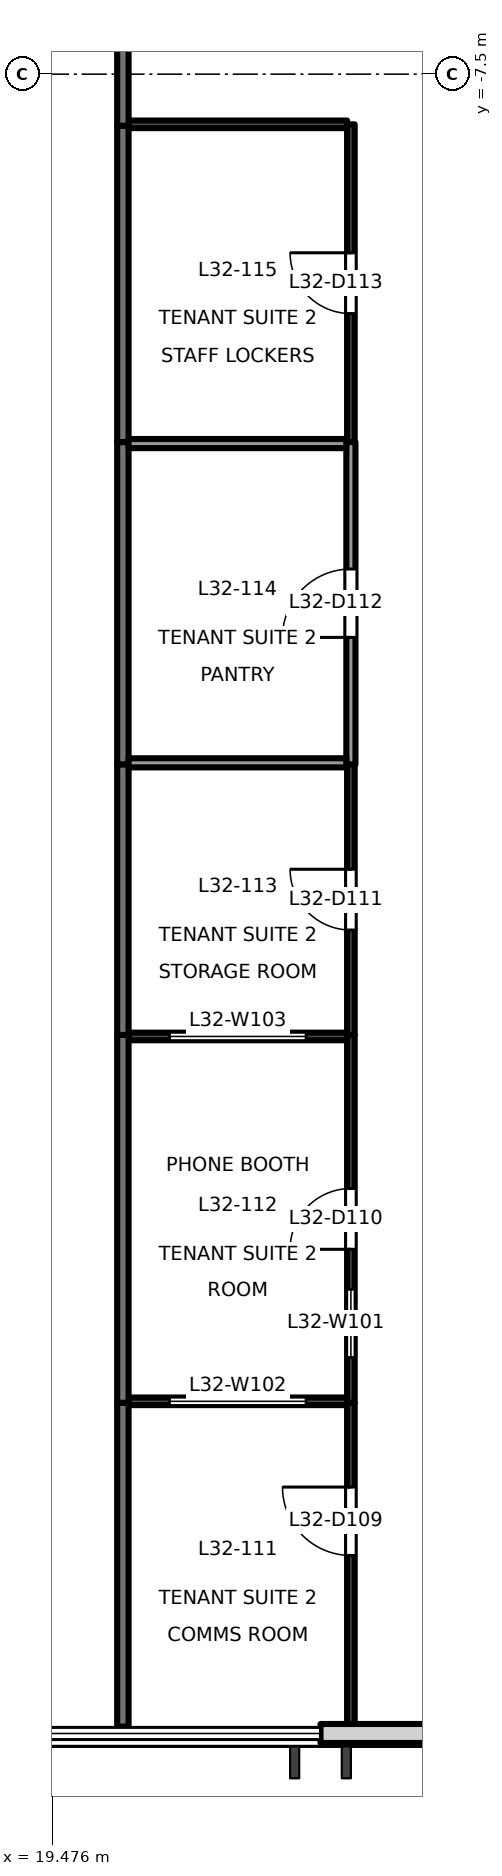
"""IFC4 building model, lengths in metres.
Left out: names, types, materials, properties, quantities, classifications, styles, units other than length and angle.
Written with IfcOpenShell. Run it as: python <this file> out.ifc"""

import sys

from ifc_helpers import new_model, si_unit, direction, frame, frame_2d, origin, place, context, subcontext, project, spatial, rectangle, extrude, element, fill, save


model = new_model("IFC4")
c1 = context("Model", 3, precision=1e-05, world=origin(), true_north=direction((0.0, 1.0)))
c2 = subcontext(c1, "Body", "Model", "MODEL_VIEW")
j1 = project(units=[si_unit("LENGTHUNIT", "METRE"), si_unit("PLANEANGLEUNIT", "RADIAN")], contexts=[c1])
p1 = place(None, origin())
s1 = spatial("IfcSite", under=j1, at=p1, CompositionType="ELEMENT")
p2 = place(p1, origin())
s2 = spatial("IfcBuilding", under=s1, at=p2, CompositionType="ELEMENT")
p3 = place(p2, frame((0.0, 0.0, 142.1)))
s3 = spatial("IfcBuildingStorey", under=s2, at=p3, CompositionType="ELEMENT", Elevation=142.1)
p4 = place(p3, frame((23.0, -29.33, 0.0), z_axis=(0.0, 0.0, 1.0), x_axis=(1.0, 0.0, 0.0)))
e1 = element("IfcWall", 1, at=p4, inside=s3, PredefinedType="SOLIDWALL", context=c2, shape_type="SweptSolid", body=[
    extrude(rectangle(XDim=2.705, YDim=0.25, at=frame_2d((1.353, 0.0))), origin(), (0.0, 0.0, 1.0), 3.8),
])
p5 = place(p3, frame((20.4, -2.14, 0.0), z_axis=(0.0, 0.0, 1.0), x_axis=(0.0, -1.0, 0.0)))
e2 = element("IfcWall", 2, at=p5, inside=s3, PredefinedType="PARTITIONING", context=c2, shape_type="SweptSolid", body=[
    extrude(rectangle(XDim=6.04, YDim=0.15, at=frame_2d((3.02, 0.0))), origin(), (0.0, 0.0, 1.0), 3.3),
])
p6 = place(p5, frame((3.055, 0.0, 0.0)))
e3 = element("IfcOpeningElement", 3, at=p6, cuts=e2, PredefinedType="OPENING", context=c2, shape_type="SweptSolid", body=[
    extrude(rectangle(XDim=1.8, YDim=2.1, at=frame_2d((0.9, 1.05))), frame((0.0, 0.085, 0.0), z_axis=(0.0, -1.0, 0.0), x_axis=(1.0, 0.0, 0.0)), (0.0, 0.0, 1.0), 0.171),
])
p7 = place(p3, frame((20.4, -24.98, 0.0), z_axis=(0.0, 0.0, 1.0), x_axis=(0.0, -1.0, 0.0)))
e4 = element("IfcWall", 4, at=p7, inside=s3, PredefinedType="PARTITIONING", context=c2, shape_type="SweptSolid", body=[
    extrude(rectangle(XDim=4.26, YDim=0.15, at=frame_2d((2.13, 0.0))), origin(), (0.0, 0.0, 1.0), 3.8),
])
p8 = place(p3, frame((20.4, -20.14, 0.0), z_axis=(0.0, 0.0, 1.0), x_axis=(0.0, -1.0, 0.0)))
e5 = element("IfcWall", 5, at=p8, inside=s3, PredefinedType="PARTITIONING", context=c2, shape_type="SweptSolid", body=[
    extrude(rectangle(XDim=4.84, YDim=0.15, at=frame_2d((2.42, 0.0))), origin(), (0.0, 0.0, 1.0), 3.8),
])
p9 = place(p3, frame((20.4, -16.58, 0.0), z_axis=(0.0, 0.0, 1.0), x_axis=(0.0, -1.0, 0.0)))
e6 = element("IfcWall", 6, at=p9, inside=s3, PredefinedType="PARTITIONING", context=c2, shape_type="SweptSolid", body=[
    extrude(rectangle(XDim=3.56, YDim=0.15, at=frame_2d((1.78, 0.0))), origin(), (0.0, 0.0, 1.0), 3.8),
])
p10 = place(p3, frame((20.4, -12.34, 0.0), z_axis=(0.0, 0.0, 1.0), x_axis=(0.0, -1.0, 0.0)))
e7 = element("IfcWall", 7, at=p10, inside=s3, PredefinedType="PARTITIONING", context=c2, shape_type="SweptSolid", body=[
    extrude(rectangle(XDim=4.24, YDim=0.15, at=frame_2d((2.12, 0.0))), origin(), (0.0, 0.0, 1.0), 3.8),
])
p11 = place(p3, frame((20.4, -8.18, 0.0), z_axis=(0.0, 0.0, 1.0), x_axis=(0.0, -1.0, 0.0)))
e8 = element("IfcWall", 8, at=p11, inside=s3, PredefinedType="PARTITIONING", context=c2, shape_type="SweptSolid", body=[
    extrude(rectangle(XDim=4.16, YDim=0.15, at=frame_2d((2.08, 0.0))), origin(), (0.0, 0.0, 1.0), 3.8),
])
p12 = place(p3, frame((23.4, -29.24, 0.0), z_axis=(0.0, 0.0, 1.0), x_axis=(0.0, 1.0, 0.0)))
e9 = element("IfcWall", 9, at=p12, inside=s3, PredefinedType="PARTITIONING", context=c2, shape_type="SweptSolid", body=[
    extrude(rectangle(XDim=4.26, YDim=0.1, at=frame_2d((2.13, 0.0))), origin(), (0.0, 0.0, 1.0), 3.8),
])
p13 = place(p12, frame((2.252, 0.0, 0.0)))
e10 = element("IfcOpeningElement", 10, at=p13, cuts=e9, PredefinedType="OPENING", context=c2, shape_type="SweptSolid", body=[
    extrude(rectangle(XDim=0.9, YDim=2.1, at=frame_2d((0.45, 1.05))), frame((0.0, 0.061, 0.0), z_axis=(0.0, -1.0, 0.0), x_axis=(1.0, 0.0, 0.0)), (0.0, 0.0, 1.0), 0.121),
])
p14 = place(p3, frame((23.4, -24.98, 0.0), z_axis=(0.0, 0.0, 1.0), x_axis=(0.0, 1.0, 0.0)))
e11 = element("IfcWall", 11, at=p14, inside=s3, PredefinedType="PARTITIONING", context=c2, shape_type="SweptSolid", body=[
    extrude(rectangle(XDim=4.84, YDim=0.1, at=frame_2d((2.42, 0.0))), origin(), (0.0, 0.0, 1.0), 3.8),
])
p15 = place(p14, frame((2.02, 0.0, 0.0)))
e12 = element("IfcOpeningElement", 12, at=p15, cuts=e11, PredefinedType="OPENING", context=c2, shape_type="SweptSolid", body=[
    extrude(rectangle(XDim=0.8, YDim=2.1, at=frame_2d((0.4, 1.05))), frame((0.0, 0.061, 0.0), z_axis=(0.0, -1.0, 0.0), x_axis=(1.0, 0.0, 0.0)), (0.0, 0.0, 1.0), 0.121),
])
p16 = place(p14, frame((0.595, 0.0, 0.9)))
e13 = element("IfcOpeningElement", 13, at=p16, cuts=e11, PredefinedType="OPENING", context=c2, shape_type="SweptSolid", body=[
    extrude(rectangle(XDim=0.9, YDim=1.2, at=frame_2d((0.45, 0.6))), frame((0.0, 0.061, 0.0), z_axis=(0.0, -1.0, 0.0), x_axis=(1.0, 0.0, 0.0)), (0.0, 0.0, 1.0), 0.121),
])
p17 = place(p3, frame((23.4, -20.14, 0.0), z_axis=(0.0, 0.0, 1.0), x_axis=(0.0, 1.0, 0.0)))
e14 = element("IfcWall", 14, at=p17, inside=s3, PredefinedType="PARTITIONING", context=c2, shape_type="SweptSolid", body=[
    extrude(rectangle(XDim=3.56, YDim=0.1, at=frame_2d((1.78, 0.0))), origin(), (0.0, 0.0, 1.0), 3.8),
])
p18 = place(p17, frame((1.38, 0.0, 0.0)))
e15 = element("IfcOpeningElement", 15, at=p18, cuts=e14, PredefinedType="OPENING", context=c2, shape_type="SweptSolid", body=[
    extrude(rectangle(XDim=0.8, YDim=2.1, at=frame_2d((0.4, 1.05))), frame((0.0, 0.061, 0.0), z_axis=(0.0, -1.0, 0.0), x_axis=(1.0, 0.0, 0.0)), (0.0, 0.0, 1.0), 0.121),
])
p19 = place(p3, frame((23.4, -16.58, 0.0), z_axis=(0.0, 0.0, 1.0), x_axis=(0.0, 1.0, 0.0)))
e16 = element("IfcWall", 16, at=p19, inside=s3, PredefinedType="PARTITIONING", context=c2, shape_type="SweptSolid", body=[
    extrude(rectangle(XDim=4.24, YDim=0.12, at=frame_2d((2.12, 0.0))), origin(), (0.0, 0.0, 1.0), 3.8),
])
p20 = place(p19, frame((1.67, 0.0, 0.0)))
e17 = element("IfcOpeningElement", 17, at=p20, cuts=e16, PredefinedType="OPENING", context=c2, shape_type="SweptSolid", body=[
    extrude(rectangle(XDim=0.9, YDim=2.1, at=frame_2d((0.45, 1.05))), frame((0.0, 0.071, 0.0), z_axis=(0.0, -1.0, 0.0), x_axis=(1.0, 0.0, 0.0)), (0.0, 0.0, 1.0), 0.141),
])
p21 = place(p3, frame((23.35, -8.16, 0.0), z_axis=(0.0, 0.0, 1.0), x_axis=(-1.0, 0.0, 0.0)))
e18 = element("IfcWall", 18, at=p21, inside=s3, PredefinedType="PARTITIONING", context=c2, shape_type="SweptSolid", body=[
    extrude(rectangle(XDim=2.875, YDim=0.1, at=frame_2d((1.438, 0.0))), origin(), (0.0, 0.0, 1.0), 3.8),
])
p22 = place(p3, frame((23.4, -12.34, 0.0), z_axis=(0.0, 0.0, 1.0), x_axis=(0.0, 1.0, 0.0)))
e19 = element("IfcWall", 19, at=p22, inside=s3, PredefinedType="PARTITIONING", context=c2, shape_type="SweptSolid", body=[
    extrude(rectangle(XDim=4.18, YDim=0.1, at=frame_2d((2.09, 0.0))), origin(), (0.0, 0.0, 1.0), 3.8),
])
p23 = place(p22, frame((1.69, 0.0, 0.0)))
e20 = element("IfcOpeningElement", 20, at=p23, cuts=e19, PredefinedType="OPENING", context=c2, shape_type="SweptSolid", body=[
    extrude(rectangle(XDim=0.8, YDim=2.1, at=frame_2d((0.4, 1.05))), frame((0.0, 0.061, 0.0), z_axis=(0.0, -1.0, 0.0), x_axis=(1.0, 0.0, 0.0)), (0.0, 0.0, 1.0), 0.121),
])
p24 = place(p3, frame((20.475, -24.96, 0.0), z_axis=(0.0, 0.0, 1.0), x_axis=(1.0, 0.0, 0.0)))
e21 = element("IfcWall", 21, at=p24, inside=s3, PredefinedType="PARTITIONING", context=c2, shape_type="SweptSolid", body=[
    extrude(rectangle(XDim=2.875, YDim=0.1, at=frame_2d((1.438, 0.0))), origin(), (0.0, 0.0, 1.0), 3.8),
])
p25 = place(p24, frame((0.537, 0.0, 0.9)))
e22 = element("IfcOpeningElement", 22, at=p25, cuts=e21, PredefinedType="OPENING", context=c2, shape_type="SweptSolid", body=[
    extrude(rectangle(XDim=1.8, YDim=1.2, at=frame_2d((0.9, 0.6))), frame((0.0, 0.061, 0.0), z_axis=(0.0, -1.0, 0.0), x_axis=(1.0, 0.0, 0.0)), (0.0, 0.0, 1.0), 0.121),
])
p26 = place(p3, frame((20.475, -20.16, 0.0), z_axis=(0.0, 0.0, 1.0), x_axis=(1.0, 0.0, 0.0)))
e23 = element("IfcWall", 23, at=p26, inside=s3, PredefinedType="PARTITIONING", context=c2, shape_type="SweptSolid", body=[
    extrude(rectangle(XDim=2.875, YDim=0.1, at=frame_2d((1.438, 0.0))), origin(), (0.0, 0.0, 1.0), 3.8),
])
p27 = place(p26, frame((0.537, 0.0, 0.9)))
e24 = element("IfcOpeningElement", 24, at=p27, cuts=e23, PredefinedType="OPENING", context=c2, shape_type="SweptSolid", body=[
    extrude(rectangle(XDim=1.8, YDim=1.2, at=frame_2d((0.9, 0.6))), frame((0.0, 0.061, 0.0), z_axis=(0.0, -1.0, 0.0), x_axis=(1.0, 0.0, 0.0)), (0.0, 0.0, 1.0), 0.121),
])
for number, where, z_axis, x_axis in (
    (25, (20.475, -16.56, 0.0), (0.0, 0.0, 1.0), (1.0, 0.0, 0.0)),
    (26, (20.475, -12.36, 0.0), (0.0, 0.0, 1.0), (1.0, 0.0, 0.0)),
):
    element("IfcWall", number, at=place(p3, frame(where, z_axis=z_axis, x_axis=x_axis)), inside=s3, PredefinedType="PARTITIONING", context=c2, shape_type="SweptSolid", body=[
        extrude(rectangle(XDim=2.865, YDim=0.12, at=frame_2d((1.433, 0.0))), origin(), (0.0, 0.0, 1.0), 3.8),
    ])
p28 = place(p13, origin())
e27 = element("IfcDoor", 27, at=p28, inside=s3, OperationType="SINGLE_SWING_RIGHT", PredefinedType="DOOR", context=c2, shape_type="SweptSolid", body=[
    extrude(rectangle(XDim=0.9, YDim=2.1, at=frame_2d((0.45, 1.05))), frame((0.0, 0.025, 0.0), z_axis=(0.0, -1.0, 0.0), x_axis=(1.0, 0.0, 0.0)), (0.0, 0.0, 1.0), 0.05),
])
fill(e10, e27)
p29 = place(p15, origin())
e28 = element("IfcDoor", 28, at=p29, inside=s3, OperationType="SINGLE_SWING_LEFT", PredefinedType="DOOR", context=c2, shape_type="SweptSolid", body=[
    extrude(rectangle(XDim=0.8, YDim=2.1, at=frame_2d((0.4, 1.05))), frame((0.0, 0.025, 0.0), z_axis=(0.0, -1.0, 0.0), x_axis=(1.0, 0.0, 0.0)), (0.0, 0.0, 1.0), 0.05),
])
fill(e12, e28)
p30 = place(p18, origin())
e29 = element("IfcDoor", 29, at=p30, inside=s3, OperationType="SINGLE_SWING_RIGHT", PredefinedType="DOOR", context=c2, shape_type="SweptSolid", body=[
    extrude(rectangle(XDim=0.8, YDim=2.1, at=frame_2d((0.4, 1.05))), frame((0.0, 0.025, 0.0), z_axis=(0.0, -1.0, 0.0), x_axis=(1.0, 0.0, 0.0)), (0.0, 0.0, 1.0), 0.05),
])
fill(e15, e29)
p31 = place(p20, origin())
e30 = element("IfcDoor", 30, at=p31, inside=s3, OperationType="SINGLE_SWING_LEFT", PredefinedType="DOOR", context=c2, shape_type="SweptSolid", body=[
    extrude(rectangle(XDim=0.9, YDim=2.1, at=frame_2d((0.45, 1.05))), frame((0.0, 0.025, 0.0), z_axis=(0.0, -1.0, 0.0), x_axis=(1.0, 0.0, 0.0)), (0.0, 0.0, 1.0), 0.05),
])
fill(e17, e30)
p32 = place(p23, origin())
e31 = element("IfcDoor", 31, at=p32, inside=s3, OperationType="SINGLE_SWING_RIGHT", PredefinedType="DOOR", context=c2, shape_type="SweptSolid", body=[
    extrude(rectangle(XDim=0.8, YDim=2.1, at=frame_2d((0.4, 1.05))), frame((0.0, 0.025, 0.0), z_axis=(0.0, -1.0, 0.0), x_axis=(1.0, 0.0, 0.0)), (0.0, 0.0, 1.0), 0.05),
])
fill(e20, e31)
p33 = place(p16, origin())
e32 = element("IfcWindow", 32, at=p33, inside=s3, PartitioningType="SINGLE_PANEL", PredefinedType="WINDOW", context=c2, shape_type="SweptSolid", body=[
    extrude(rectangle(XDim=0.9, YDim=1.2, at=frame_2d((0.45, 0.6))), frame((0.0, 0.03, 0.0), z_axis=(0.0, -1.0, 0.0), x_axis=(1.0, 0.0, 0.0)), (0.0, 0.0, 1.0), 0.06),
])
fill(e13, e32)
p34 = place(p25, origin())
e33 = element("IfcWindow", 33, at=p34, inside=s3, PartitioningType="SINGLE_PANEL", PredefinedType="WINDOW", context=c2, shape_type="SweptSolid", body=[
    extrude(rectangle(XDim=1.8, YDim=1.2, at=frame_2d((0.9, 0.6))), frame((0.0, 0.03, 0.0), z_axis=(0.0, -1.0, 0.0), x_axis=(1.0, 0.0, 0.0)), (0.0, 0.0, 1.0), 0.06),
])
fill(e22, e33)
p35 = place(p27, origin())
e34 = element("IfcWindow", 34, at=p35, inside=s3, PartitioningType="SINGLE_PANEL", PredefinedType="WINDOW", context=c2, shape_type="SweptSolid", body=[
    extrude(rectangle(XDim=1.8, YDim=1.2, at=frame_2d((0.9, 0.6))), frame((0.0, 0.03, 0.0), z_axis=(0.0, -1.0, 0.0), x_axis=(1.0, 0.0, 0.0)), (0.0, 0.0, 1.0), 0.06),
])
fill(e24, e34)
save(model, sys.argv[1])
